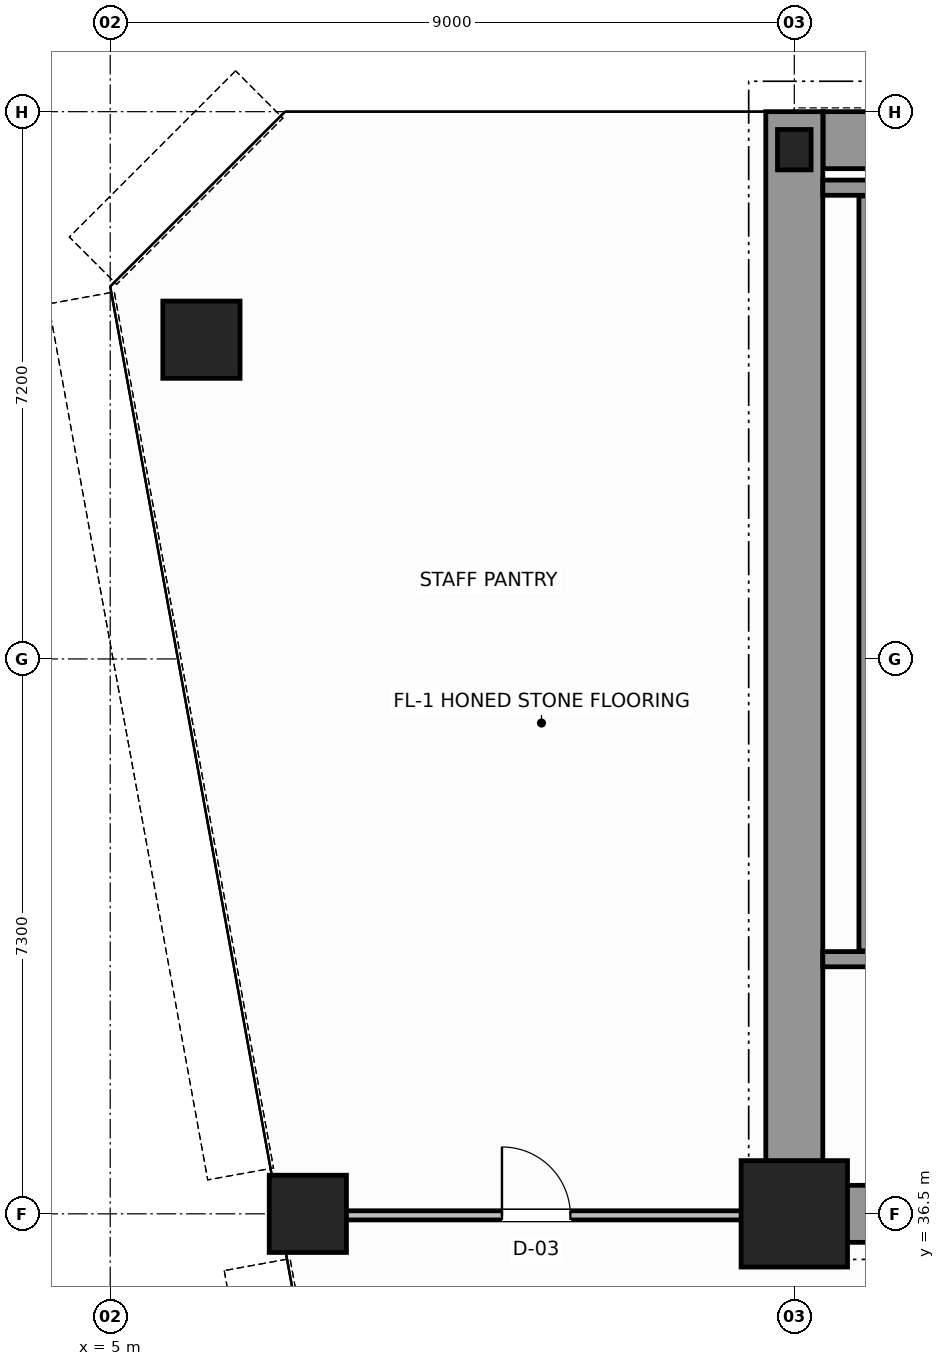
"""IFC4 building model, lengths in metres.
Left out: names, types, materials, properties, quantities, classifications, styles, units other than length and angle.
Written with IfcOpenShell. Run it as: python <this file> out.ifc"""

import sys

from ifc_helpers import new_model, si_unit, direction, frame, frame_2d, origin, origin_2d, place, context, subcontext, project, spatial, rectangle, hollow_circle, i_section, extrude, source, transform, mapped, element, fill, save


model = new_model("IFC4")
c1 = context("Model", 3, precision=1e-05, world=origin(), true_north=direction((0.0, 1.0)))
c2 = subcontext(c1, "Body", "Model", "MODEL_VIEW")
j1 = project(units=[si_unit("LENGTHUNIT", "METRE"), si_unit("PLANEANGLEUNIT", "RADIAN")], contexts=[c1])
p1 = place(None, origin())
s1 = spatial("IfcSite", under=j1, at=p1, CompositionType="ELEMENT")
p2 = place(p1, origin())
s2 = spatial("IfcBuilding", under=s1, at=p2, CompositionType="ELEMENT")
p3 = place(p2, frame((0.0, 0.0, 126.2)))
s3 = spatial("IfcBuildingStorey", under=s2, at=p3, CompositionType="ELEMENT", Elevation=126.2)
m1 = source(origin(), c2, "Body", "SweptSolid", [
    extrude(rectangle(XDim=1.4, YDim=1.4, at=origin_2d()), origin(), (0.0, 0.0, 1.0), 3.8),
])
p4 = place(p3, frame((14.0, 36.5, 0.0), z_axis=(0.0, 0.0, 1.0), x_axis=(1.0, 0.0, 0.0)))
e1 = element("IfcColumn", 1, at=p4, inside=s3, PredefinedType="COLUMN", context=c2, shape_type="MappedRepresentation", body=[
    mapped(m1, transform((0.0, 0.0, 0.0), scale=1.0)),
])
m2 = source(origin(), c2, "Body", "SweptSolid", [
    extrude(i_section(OverallWidth=0.442, OverallDepth=0.531, WebThickness=0.065, FlangeThickness=0.076, FilletRadius=0.015, at=origin_2d()), origin(), (0.0, 0.0, 1.0), 3.8),
])
p5 = place(p3, frame((14.0, 50.5, 0.0), z_axis=(0.0, 0.0, 1.0), x_axis=(1.0, 0.0, 0.0)))
e2 = element("IfcColumn", 2, at=p5, inside=s3, PredefinedType="COLUMN", context=c2, shape_type="MappedRepresentation", body=[
    mapped(m2, transform((0.0, 0.0, 0.0), scale=1.0)),
])
m3 = source(origin(), c2, "Body", "SweptSolid", [
    extrude(hollow_circle(Radius=0.508, WallThickness=0.045, at=origin_2d()), origin(), (0.0, 0.0, 1.0), 3.8),
])
for number, where, z_axis, x_axis in (
    (3, (6.2, 48.0, 0.0), (0.0, 0.0, 1.0), (1.0, 0.0, 0.0)),
    (4, (7.6, 36.5, 0.0), (0.0, 0.0, 1.0), (1.0, 0.0, 0.0)),
):
    element("IfcColumn", number, at=place(p3, frame(where, z_axis=z_axis, x_axis=x_axis)), inside=s3, PredefinedType="COLUMN", context=c2, shape_type="MappedRepresentation", body=[
        mapped(m3, transform((0.0, 0.0, 0.0), scale=1.0)),
    ])
p6 = place(p3, frame((14.379, 50.625, 0.0), z_axis=(0.0, 0.0, 1.0), x_axis=(1.0, 0.0, 0.0)))
e5 = element("IfcWall", 5, at=p6, inside=s3, PredefinedType="SHEAR", context=c2, shape_type="SweptSolid", body=[
    extrude(rectangle(XDim=19.619, YDim=0.75, at=frame_2d((9.81, 0.0))), origin(), (0.0, 0.0, 1.0), 3.8),
])
p7 = place(p3, frame((14.0, 36.5, 0.0), z_axis=(0.0, 0.0, 1.0), x_axis=(0.0, 1.0, 0.0)))
e6 = element("IfcWall", 6, at=p7, inside=s3, PredefinedType="SHEAR", context=c2, shape_type="SweptSolid", body=[
    extrude(rectangle(XDim=14.5, YDim=0.75, at=frame_2d((7.25, 0.0))), origin(), (0.0, 0.0, 1.0), 3.8),
])
p8 = place(p3, frame((14.395, 36.5, 0.0), z_axis=(0.0, 0.0, 1.0), x_axis=(1.0, 0.0, 0.0)))
e7 = element("IfcWall", 7, at=p8, inside=s3, PredefinedType="SHEAR", context=c2, shape_type="SweptSolid", body=[
    extrude(rectangle(XDim=3.805, YDim=0.75, at=frame_2d((1.902, 0.0))), origin(), (0.0, 0.0, 1.0), 2.38),
])
p9 = place(p3, frame((14.375, 39.85, 0.0), z_axis=(0.0, 0.0, 1.0), x_axis=(1.0, 0.0, 0.0)))
e8 = element("IfcWall", 8, at=p9, inside=s3, PredefinedType="SOLIDWALL", context=c2, shape_type="SweptSolid", body=[
    extrude(rectangle(XDim=4.225, YDim=0.2, at=frame_2d((2.113, 0.0))), origin(), (0.0, 0.0, 1.0), 3.8),
])
p10 = place(p9, frame((1.8, 0.0, 0.0)))
e9 = element("IfcOpeningElement", 9, at=p10, cuts=e8, PredefinedType="OPENING", context=c2, shape_type="SweptSolid", body=[
    extrude(rectangle(XDim=1.1, YDim=2.15, at=frame_2d((0.55, 1.075))), frame((0.0, 0.11, 0.0), z_axis=(0.0, -1.0, 0.0), x_axis=(1.0, 0.0, 0.0)), (0.0, 0.0, 1.0), 0.22),
])
p11 = place(p3, frame((14.375, 50.0, 0.0), z_axis=(0.0, 0.0, 1.0), x_axis=(1.0, 0.0, 0.0)))
e10 = element("IfcWall", 10, at=p11, inside=s3, PredefinedType="SOLIDWALL", context=c2, shape_type="SweptSolid", body=[
    extrude(rectangle(XDim=4.225, YDim=0.2, at=frame_2d((2.113, 0.0))), origin(), (0.0, 0.0, 1.0), 3.8),
])
p12 = place(p3, frame((14.95, 39.96, 0.0), z_axis=(0.0, 0.0, 1.0), x_axis=(0.0, 1.0, 0.0)))
e11 = element("IfcWall", 11, at=p12, inside=s3, PredefinedType="SOLIDWALL", context=c2, shape_type="SweptSolid", body=[
    extrude(rectangle(XDim=9.93, YDim=0.2, at=frame_2d((4.965, 0.0))), origin(), (0.0, 0.0, 1.0), 3.8),
])
p13 = place(p3, frame((7.267, 36.48, 0.0), z_axis=(0.0, 0.0, 1.0), x_axis=(1.0, 0.0, 0.0)))
e12 = element("IfcWall", 12, at=p13, inside=s3, PredefinedType="PARTITIONING", context=c2, shape_type="SweptSolid", body=[
    extrude(rectangle(XDim=6.673, YDim=0.12, at=frame_2d((3.336, 0.0))), origin(), (0.0, 0.0, 1.0), 2.87),
])
p14 = place(p13, frame((2.887, 0.0, 0.0)))
e13 = element("IfcOpeningElement", 13, at=p14, cuts=e12, PredefinedType="OPENING", context=c2, shape_type="SweptSolid", body=[
    extrude(rectangle(XDim=0.9, YDim=2.15, at=frame_2d((0.45, 1.075))), frame((0.0, 0.07, 0.0), z_axis=(0.0, -1.0, 0.0), x_axis=(1.0, 0.0, 0.0)), (0.0, 0.0, 1.0), 0.14),
])
m4 = source(origin(), c2, "Body", "SweptSolid", [
    extrude(rectangle(XDim=0.9, YDim=2.15, at=frame_2d((0.45, 1.075))), frame((0.0, 0.025, 0.0), z_axis=(0.0, -1.0, 0.0), x_axis=(1.0, 0.0, 0.0)), (0.0, 0.0, 1.0), 0.05),
])
p15 = place(p14, origin())
e14 = element("IfcDoor", 14, at=p15, inside=s3, OperationType="SINGLE_SWING_LEFT", PredefinedType="DOOR", context=c2, shape_type="MappedRepresentation", body=[
    mapped(m4, transform((0.0, 0.0, 0.0), scale=1.0)),
])
fill(e13, e14)
save(model, sys.argv[1])
